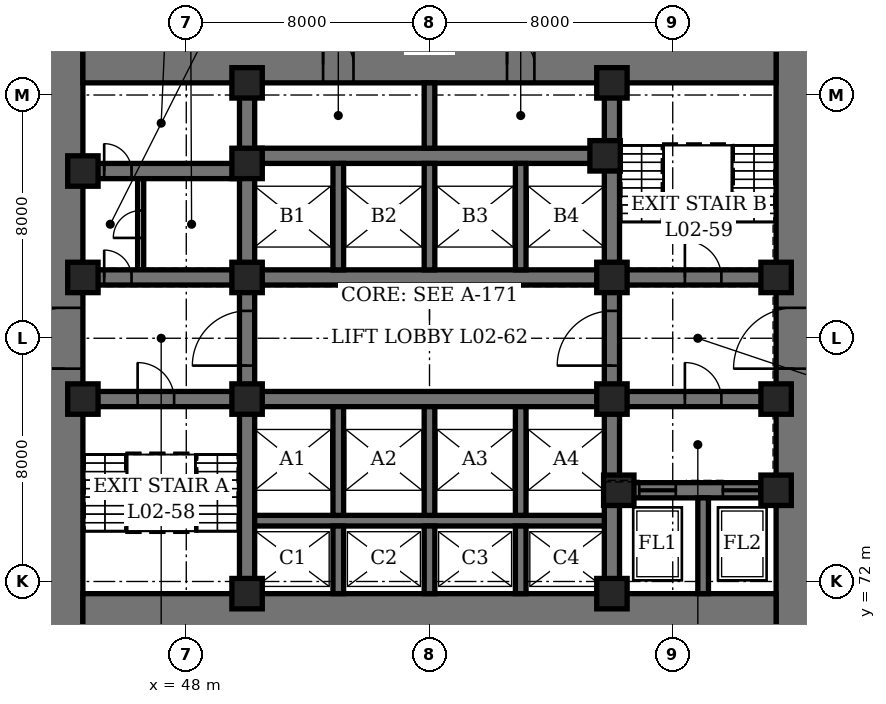
"""IFC4 building model, lengths in metres.
Left out: names, types, materials, properties, quantities, classifications, styles, units other than length and angle.
Written with IfcOpenShell. Run it as: python <this file> out.ifc"""

import sys

from ifc_helpers import new_model, si_unit, direction, frame, frame_2d, origin, origin_2d, place, context, subcontext, project, spatial, rectangle, hollow_rectangle, extrude, element, fill, save


model = new_model("IFC4")
c1 = context("Model", 3, precision=1e-05, world=origin(), true_north=direction((0.0, 1.0)))
c2 = subcontext(c1, "Body", "Model", "MODEL_VIEW")
j1 = project(units=[si_unit("LENGTHUNIT", "METRE"), si_unit("PLANEANGLEUNIT", "RADIAN")], contexts=[c1])
p1 = place(None, origin())
s1 = spatial("IfcSite", under=j1, at=p1, CompositionType="ELEMENT")
p2 = place(p1, origin())
s2 = spatial("IfcBuilding", under=s1, at=p2, CompositionType="ELEMENT")
p3 = place(p2, frame((0.0, 0.0, 9.9)))
s3 = spatial("IfcBuildingStorey", under=s2, at=p3, CompositionType="ELEMENT", Elevation=9.9)
p4 = place(p3, frame((44.0, 70.4, 0.0), z_axis=(0.0, 0.0, 1.0), x_axis=(0.0, 1.0, 0.0)))
e1 = element("IfcWall", 1, at=p4, inside=s3, PredefinedType="SHEAR", context=c2, shape_type="SweptSolid", body=[
    extrude(rectangle(XDim=19.2, YDim=1.2, at=frame_2d((9.6, 0.0))), origin(), (0.0, 0.0, 1.0), 5.0),
])
p5 = place(p4, frame((8.6, 0.0, 0.0)))
e2 = element("IfcOpeningElement", 2, at=p5, cuts=e1, PredefinedType="OPENING", context=c2, shape_type="SweptSolid", body=[
    extrude(rectangle(XDim=2.0, YDim=2.4, at=frame_2d((1.0, 1.2))), frame((0.0, 0.61, 0.0), z_axis=(0.0, -1.0, 0.0), x_axis=(1.0, 0.0, 0.0)), (0.0, 0.0, 1.0), 1.22),
])
p6 = place(p3, frame((68.0, 70.4, 0.0), z_axis=(0.0, 0.0, 1.0), x_axis=(0.0, 1.0, 0.0)))
e3 = element("IfcWall", 3, at=p6, inside=s3, PredefinedType="SHEAR", context=c2, shape_type="SweptSolid", body=[
    extrude(rectangle(XDim=19.2, YDim=1.2, at=frame_2d((9.6, 0.0))), origin(), (0.0, 0.0, 1.0), 5.0),
])
p7 = place(p6, frame((8.6, 0.0, 0.0)))
e4 = element("IfcOpeningElement", 4, at=p7, cuts=e3, PredefinedType="OPENING", context=c2, shape_type="SweptSolid", body=[
    extrude(rectangle(XDim=2.0, YDim=2.4, at=frame_2d((1.0, 1.2))), frame((0.0, 0.61, 0.0), z_axis=(0.0, -1.0, 0.0), x_axis=(1.0, 0.0, 0.0)), (0.0, 0.0, 1.0), 1.22),
])
p8 = place(p3, frame((44.6, 71.0, 0.0), z_axis=(0.0, 0.0, 1.0), x_axis=(1.0, 0.0, 0.0)))
e5 = element("IfcWall", 5, at=p8, inside=s3, PredefinedType="SHEAR", context=c2, shape_type="SweptSolid", body=[
    extrude(rectangle(XDim=22.8, YDim=1.2, at=frame_2d((11.4, 0.0))), origin(), (0.0, 0.0, 1.0), 5.0),
])
p9 = place(p3, frame((44.6, 89.0, 0.0), z_axis=(0.0, 0.0, 1.0), x_axis=(1.0, 0.0, 0.0)))
e6 = element("IfcWall", 6, at=p9, inside=s3, PredefinedType="SHEAR", context=c2, shape_type="SweptSolid", body=[
    extrude(rectangle(XDim=22.8, YDim=1.2, at=frame_2d((11.4, 0.0))), origin(), (0.0, 0.0, 1.0), 5.0),
])
p10 = place(p9, frame((7.9, 0.0, 0.0)))
e7 = element("IfcOpeningElement", 7, at=p10, cuts=e6, PredefinedType="OPENING", context=c2, shape_type="SweptSolid", body=[
    extrude(rectangle(XDim=1.0, YDim=2.1, at=frame_2d((0.5, 1.05))), frame((0.0, 0.61, 0.0), z_axis=(0.0, -1.0, 0.0), x_axis=(1.0, 0.0, 0.0)), (0.0, 0.0, 1.0), 1.22),
])
p11 = place(p9, frame((13.95, 0.0, 0.0)))
e8 = element("IfcOpeningElement", 8, at=p11, cuts=e6, PredefinedType="OPENING", context=c2, shape_type="SweptSolid", body=[
    extrude(rectangle(XDim=0.9, YDim=2.1, at=frame_2d((0.45, 1.05))), frame((0.0, 0.61, 0.0), z_axis=(0.0, -1.0, 0.0), x_axis=(1.0, 0.0, 0.0)), (0.0, 0.0, 1.0), 1.22),
])
p12 = place(p3, frame((50.0, 71.6, 0.0), z_axis=(0.0, 0.0, 1.0), x_axis=(0.0, 1.0, 0.0)))
e9 = element("IfcWall", 9, at=p12, inside=s3, PredefinedType="SHEAR", context=c2, shape_type="SweptSolid", body=[
    extrude(rectangle(XDim=16.8, YDim=0.5, at=frame_2d((8.4, 0.0))), origin(), (0.0, 0.0, 1.0), 5.0),
])
p13 = place(p12, frame((7.5, 0.0, 0.0)))
e10 = element("IfcOpeningElement", 10, at=p13, cuts=e9, PredefinedType="OPENING", context=c2, shape_type="SweptSolid", body=[
    extrude(rectangle(XDim=1.8, YDim=2.4, at=frame_2d((0.9, 1.2))), frame((0.0, 0.26, 0.0), z_axis=(0.0, -1.0, 0.0), x_axis=(1.0, 0.0, 0.0)), (0.0, 0.0, 1.0), 0.52),
])
p14 = place(p3, frame((62.0, 71.6, 0.0), z_axis=(0.0, 0.0, 1.0), x_axis=(0.0, 1.0, 0.0)))
e11 = element("IfcWall", 11, at=p14, inside=s3, PredefinedType="SHEAR", context=c2, shape_type="SweptSolid", body=[
    extrude(rectangle(XDim=16.8, YDim=0.5, at=frame_2d((8.4, 0.0))), origin(), (0.0, 0.0, 1.0), 5.0),
])
p15 = place(p14, frame((7.5, 0.0, 0.0)))
e12 = element("IfcOpeningElement", 12, at=p15, cuts=e11, PredefinedType="OPENING", context=c2, shape_type="SweptSolid", body=[
    extrude(rectangle(XDim=1.8, YDim=2.4, at=frame_2d((0.9, 1.2))), frame((0.0, 0.26, 0.0), z_axis=(0.0, -1.0, 0.0), x_axis=(1.0, 0.0, 0.0)), (0.0, 0.0, 1.0), 0.52),
])
p16 = place(p3, frame((44.6, 78.0, 0.0), z_axis=(0.0, 0.0, 1.0), x_axis=(1.0, 0.0, 0.0)))
e13 = element("IfcWall", 13, at=p16, inside=s3, PredefinedType="SHEAR", context=c2, shape_type="SweptSolid", body=[
    extrude(rectangle(XDim=5.15, YDim=0.5, at=frame_2d((2.575, 0.0))), origin(), (0.0, 0.0, 1.0), 5.0),
])
p17 = place(p16, frame((1.8, 0.0, 0.0)))
e14 = element("IfcOpeningElement", 14, at=p17, cuts=e13, PredefinedType="OPENING", context=c2, shape_type="SweptSolid", body=[
    extrude(rectangle(XDim=1.2, YDim=2.1, at=frame_2d((0.6, 1.05))), frame((0.0, 0.26, 0.0), z_axis=(0.0, -1.0, 0.0), x_axis=(1.0, 0.0, 0.0)), (0.0, 0.0, 1.0), 0.52),
])
p18 = place(p3, frame((44.6, 82.0, 0.0), z_axis=(0.0, 0.0, 1.0), x_axis=(1.0, 0.0, 0.0)))
e15 = element("IfcWall", 15, at=p18, inside=s3, PredefinedType="SHEAR", context=c2, shape_type="SweptSolid", body=[
    extrude(rectangle(XDim=5.15, YDim=0.5, at=frame_2d((2.575, 0.0))), origin(), (0.0, 0.0, 1.0), 5.0),
])
p19 = place(p18, frame((0.7, 0.0, 0.0)))
e16 = element("IfcOpeningElement", 16, at=p19, cuts=e15, PredefinedType="OPENING", context=c2, shape_type="SweptSolid", body=[
    extrude(rectangle(XDim=0.9, YDim=2.1, at=frame_2d((0.45, 1.05))), frame((0.0, 0.26, 0.0), z_axis=(0.0, -1.0, 0.0), x_axis=(1.0, 0.0, 0.0)), (0.0, 0.0, 1.0), 0.52),
])
p20 = place(p3, frame((44.6, 85.5, 0.0), z_axis=(0.0, 0.0, 1.0), x_axis=(1.0, 0.0, 0.0)))
e17 = element("IfcWall", 17, at=p20, inside=s3, PredefinedType="SHEAR", context=c2, shape_type="SweptSolid", body=[
    extrude(rectangle(XDim=5.15, YDim=0.5, at=frame_2d((2.575, 0.0))), origin(), (0.0, 0.0, 1.0), 5.0),
])
p21 = place(p20, frame((0.7, 0.0, 0.0)))
e18 = element("IfcOpeningElement", 18, at=p21, cuts=e17, PredefinedType="OPENING", context=c2, shape_type="SweptSolid", body=[
    extrude(rectangle(XDim=0.9, YDim=2.1, at=frame_2d((0.45, 1.05))), frame((0.0, 0.26, 0.0), z_axis=(0.0, -1.0, 0.0), x_axis=(1.0, 0.0, 0.0)), (0.0, 0.0, 1.0), 0.52),
])
p22 = place(p3, frame((62.25, 75.0, 0.0), z_axis=(0.0, 0.0, 1.0), x_axis=(1.0, 0.0, 0.0)))
e19 = element("IfcWall", 19, at=p22, inside=s3, PredefinedType="SHEAR", context=c2, shape_type="SweptSolid", body=[
    extrude(rectangle(XDim=5.15, YDim=0.5, at=frame_2d((2.575, 0.0))), origin(), (0.0, 0.0, 1.0), 5.0),
])
p23 = place(p22, frame((0.65, 0.0, 0.0)))
e20 = element("IfcOpeningElement", 20, at=p23, cuts=e19, PredefinedType="OPENING", context=c2, shape_type="SweptSolid", body=[
    extrude(rectangle(XDim=1.2, YDim=2.2, at=frame_2d((0.6, 1.1))), frame((0.0, 0.26, 0.0), z_axis=(0.0, -1.0, 0.0), x_axis=(1.0, 0.0, 0.0)), (0.0, 0.0, 1.0), 0.52),
])
p24 = place(p22, frame((3.4, 0.0, 0.0)))
e21 = element("IfcOpeningElement", 21, at=p24, cuts=e19, PredefinedType="OPENING", context=c2, shape_type="SweptSolid", body=[
    extrude(rectangle(XDim=1.2, YDim=2.2, at=frame_2d((0.6, 1.1))), frame((0.0, 0.26, 0.0), z_axis=(0.0, -1.0, 0.0), x_axis=(1.0, 0.0, 0.0)), (0.0, 0.0, 1.0), 0.52),
])
p25 = place(p3, frame((62.25, 78.0, 0.0), z_axis=(0.0, 0.0, 1.0), x_axis=(1.0, 0.0, 0.0)))
e22 = element("IfcWall", 22, at=p25, inside=s3, PredefinedType="SHEAR", context=c2, shape_type="SweptSolid", body=[
    extrude(rectangle(XDim=5.15, YDim=0.5, at=frame_2d((2.575, 0.0))), origin(), (0.0, 0.0, 1.0), 5.0),
])
p26 = place(p25, frame((2.15, 0.0, 0.0)))
e23 = element("IfcOpeningElement", 23, at=p26, cuts=e22, PredefinedType="OPENING", context=c2, shape_type="SweptSolid", body=[
    extrude(rectangle(XDim=1.2, YDim=2.1, at=frame_2d((0.6, 1.05))), frame((0.0, 0.26, 0.0), z_axis=(0.0, -1.0, 0.0), x_axis=(1.0, 0.0, 0.0)), (0.0, 0.0, 1.0), 0.52),
])
p27 = place(p3, frame((62.25, 82.0, 0.0), z_axis=(0.0, 0.0, 1.0), x_axis=(1.0, 0.0, 0.0)))
e24 = element("IfcWall", 24, at=p27, inside=s3, PredefinedType="SHEAR", context=c2, shape_type="SweptSolid", body=[
    extrude(rectangle(XDim=5.15, YDim=0.5, at=frame_2d((2.575, 0.0))), origin(), (0.0, 0.0, 1.0), 5.0),
])
p28 = place(p27, frame((2.15, 0.0, 0.0)))
e25 = element("IfcOpeningElement", 25, at=p28, cuts=e24, PredefinedType="OPENING", context=c2, shape_type="SweptSolid", body=[
    extrude(rectangle(XDim=1.2, YDim=2.1, at=frame_2d((0.6, 1.05))), frame((0.0, 0.26, 0.0), z_axis=(0.0, -1.0, 0.0), x_axis=(1.0, 0.0, 0.0)), (0.0, 0.0, 1.0), 0.52),
])
for number, where, z_axis, x_axis in (
    (26, (50.25, 78.0, 0.0), (0.0, 0.0, 1.0), (1.0, 0.0, 0.0)),
    (27, (50.25, 82.0, 0.0), (0.0, 0.0, 1.0), (1.0, 0.0, 0.0)),
    (28, (50.25, 86.0, 0.0), (0.0, 0.0, 1.0), (1.0, 0.0, 0.0)),
):
    element("IfcWall", number, at=place(p3, frame(where, z_axis=z_axis, x_axis=x_axis)), inside=s3, PredefinedType="SHEAR", context=c2, shape_type="SweptSolid", body=[
        extrude(rectangle(XDim=11.5, YDim=0.5, at=frame_2d((5.75, 0.0))), origin(), (0.0, 0.0, 1.0), 5.0),
    ])
p29 = place(p3, frame((50.25, 74.0, 0.0), z_axis=(0.0, 0.0, 1.0), x_axis=(1.0, 0.0, 0.0)))
e29 = element("IfcWall", 29, at=p29, inside=s3, PredefinedType="SHEAR", context=c2, shape_type="SweptSolid", body=[
    extrude(rectangle(XDim=11.5, YDim=0.35, at=frame_2d((5.75, 0.0))), origin(), (0.0, 0.0, 1.0), 5.0),
])
p30 = place(p3, frame((53.0, 71.6, 0.0), z_axis=(0.0, 0.0, 1.0), x_axis=(0.0, 1.0, 0.0)))
e30 = element("IfcWall", 30, at=p30, inside=s3, PredefinedType="SHEAR", context=c2, shape_type="SweptSolid", body=[
    extrude(rectangle(XDim=2.225, YDim=0.35, at=frame_2d((1.112, 0.0))), origin(), (0.0, 0.0, 1.0), 5.0),
])
p31 = place(p3, frame((53.0, 74.175, 0.0), z_axis=(0.0, 0.0, 1.0), x_axis=(0.0, 1.0, 0.0)))
e31 = element("IfcWall", 31, at=p31, inside=s3, PredefinedType="SHEAR", context=c2, shape_type="SweptSolid", body=[
    extrude(rectangle(XDim=3.575, YDim=0.35, at=frame_2d((1.788, 0.0))), origin(), (0.0, 0.0, 1.0), 5.0),
])
p32 = place(p3, frame((53.0, 82.25, 0.0), z_axis=(0.0, 0.0, 1.0), x_axis=(0.0, 1.0, 0.0)))
e32 = element("IfcWall", 32, at=p32, inside=s3, PredefinedType="SHEAR", context=c2, shape_type="SweptSolid", body=[
    extrude(rectangle(XDim=3.5, YDim=0.35, at=frame_2d((1.75, 0.0))), origin(), (0.0, 0.0, 1.0), 5.0),
])
p33 = place(p3, frame((56.0, 71.6, 0.0), z_axis=(0.0, 0.0, 1.0), x_axis=(0.0, 1.0, 0.0)))
e33 = element("IfcWall", 33, at=p33, inside=s3, PredefinedType="SHEAR", context=c2, shape_type="SweptSolid", body=[
    extrude(rectangle(XDim=2.225, YDim=0.35, at=frame_2d((1.112, 0.0))), origin(), (0.0, 0.0, 1.0), 5.0),
])
p34 = place(p3, frame((56.0, 74.175, 0.0), z_axis=(0.0, 0.0, 1.0), x_axis=(0.0, 1.0, 0.0)))
e34 = element("IfcWall", 34, at=p34, inside=s3, PredefinedType="SHEAR", context=c2, shape_type="SweptSolid", body=[
    extrude(rectangle(XDim=3.575, YDim=0.35, at=frame_2d((1.788, 0.0))), origin(), (0.0, 0.0, 1.0), 5.0),
])
p35 = place(p3, frame((56.0, 82.25, 0.0), z_axis=(0.0, 0.0, 1.0), x_axis=(0.0, 1.0, 0.0)))
e35 = element("IfcWall", 35, at=p35, inside=s3, PredefinedType="SHEAR", context=c2, shape_type="SweptSolid", body=[
    extrude(rectangle(XDim=3.5, YDim=0.35, at=frame_2d((1.75, 0.0))), origin(), (0.0, 0.0, 1.0), 5.0),
])
p36 = place(p3, frame((59.0, 71.6, 0.0), z_axis=(0.0, 0.0, 1.0), x_axis=(0.0, 1.0, 0.0)))
e36 = element("IfcWall", 36, at=p36, inside=s3, PredefinedType="SHEAR", context=c2, shape_type="SweptSolid", body=[
    extrude(rectangle(XDim=2.225, YDim=0.35, at=frame_2d((1.112, 0.0))), origin(), (0.0, 0.0, 1.0), 5.0),
])
p37 = place(p3, frame((59.0, 74.175, 0.0), z_axis=(0.0, 0.0, 1.0), x_axis=(0.0, 1.0, 0.0)))
e37 = element("IfcWall", 37, at=p37, inside=s3, PredefinedType="SHEAR", context=c2, shape_type="SweptSolid", body=[
    extrude(rectangle(XDim=3.575, YDim=0.35, at=frame_2d((1.788, 0.0))), origin(), (0.0, 0.0, 1.0), 5.0),
])
p38 = place(p3, frame((59.0, 82.25, 0.0), z_axis=(0.0, 0.0, 1.0), x_axis=(0.0, 1.0, 0.0)))
e38 = element("IfcWall", 38, at=p38, inside=s3, PredefinedType="SHEAR", context=c2, shape_type="SweptSolid", body=[
    extrude(rectangle(XDim=3.5, YDim=0.35, at=frame_2d((1.75, 0.0))), origin(), (0.0, 0.0, 1.0), 5.0),
])
p39 = place(p3, frame((65.0, 71.6, 0.0), z_axis=(0.0, 0.0, 1.0), x_axis=(0.0, 1.0, 0.0)))
e39 = element("IfcWall", 39, at=p39, inside=s3, PredefinedType="SHEAR", context=c2, shape_type="SweptSolid", body=[
    extrude(rectangle(XDim=3.15, YDim=0.35, at=frame_2d((1.575, 0.0))), origin(), (0.0, 0.0, 1.0), 5.0),
])
p40 = place(p3, frame((56.0, 86.25, 0.0), z_axis=(0.0, 0.0, 1.0), x_axis=(0.0, 1.0, 0.0)))
e40 = element("IfcWall", 40, at=p40, inside=s3, PredefinedType="SHEAR", context=c2, shape_type="SweptSolid", body=[
    extrude(rectangle(XDim=2.15, YDim=0.35, at=frame_2d((1.075, 0.0))), origin(), (0.0, 0.0, 1.0), 5.0),
])
for number, where, z_axis, x_axis in (
    (41, (44.6, 78.0, 0.0), (0.0, 0.0, 1.0), (1.0, 0.0, 0.0)),
    (42, (44.6, 82.0, 0.0), (0.0, 0.0, 1.0), (1.0, 0.0, 0.0)),
    (43, (44.6, 85.5, 0.0), (0.0, 0.0, 1.0), (1.0, 0.0, 0.0)),
    (44, (50.0, 71.6, 0.0), (0.0, 0.0, 1.0), (1.0, 0.0, 0.0)),
    (45, (50.0, 78.0, 0.0), (0.0, 0.0, 1.0), (1.0, 0.0, 0.0)),
    (46, (50.0, 82.0, 0.0), (0.0, 0.0, 1.0), (1.0, 0.0, 0.0)),
    (47, (50.0, 85.75, 0.0), (0.0, 0.0, 1.0), (1.0, 0.0, 0.0)),
    (48, (50.0, 88.4, 0.0), (0.0, 0.0, 1.0), (1.0, 0.0, 0.0)),
    (49, (61.775, 86.0, 0.0), (0.0, 0.0, 1.0), (1.0, 0.0, 0.0)),
    (50, (62.0, 71.6, 0.0), (0.0, 0.0, 1.0), (1.0, 0.0, 0.0)),
    (51, (62.0, 78.0, 0.0), (0.0, 0.0, 1.0), (1.0, 0.0, 0.0)),
    (52, (62.0, 82.0, 0.0), (0.0, 0.0, 1.0), (1.0, 0.0, 0.0)),
    (53, (62.0, 88.4, 0.0), (0.0, 0.0, 1.0), (1.0, 0.0, 0.0)),
    (54, (62.225, 75.0, 0.0), (0.0, 0.0, 1.0), (1.0, 0.0, 0.0)),
    (55, (67.4, 75.0, 0.0), (0.0, 0.0, 1.0), (1.0, 0.0, 0.0)),
    (56, (67.4, 78.0, 0.0), (0.0, 0.0, 1.0), (1.0, 0.0, 0.0)),
    (57, (67.4, 82.0, 0.0), (0.0, 0.0, 1.0), (1.0, 0.0, 0.0)),
):
    element("IfcColumn", number, at=place(p3, frame(where, z_axis=z_axis, x_axis=x_axis)), inside=s3, PredefinedType="COLUMN", context=c2, shape_type="SweptSolid", body=[
        extrude(hollow_rectangle(XDim=1.0, YDim=1.0, WallThickness=0.15, at=origin_2d()), origin(), (0.0, 0.0, 1.0), 5.0),
    ])
p41 = place(p3, frame((46.5, 82.25, 0.0), z_axis=(0.0, 0.0, 1.0), x_axis=(0.0, 1.0, 0.0)))
e58 = element("IfcWall", 58, at=p41, inside=s3, PredefinedType="PARTITIONING", context=c2, shape_type="SweptSolid", body=[
    extrude(rectangle(XDim=3.0, YDim=0.2, at=frame_2d((1.5, 0.0))), origin(), (0.0, 0.0, 1.0), 4.8),
])
p42 = place(p41, frame((1.05, 0.0, 0.0)))
e59 = element("IfcOpeningElement", 59, at=p42, cuts=e58, PredefinedType="OPENING", context=c2, shape_type="SweptSolid", body=[
    extrude(rectangle(XDim=0.9, YDim=2.1, at=frame_2d((0.45, 1.05))), frame((0.0, 0.11, 0.0), z_axis=(0.0, -1.0, 0.0), x_axis=(1.0, 0.0, 0.0)), (0.0, 0.0, 1.0), 0.22),
])
p43 = place(p19, origin())
e60 = element("IfcDoor", 60, at=p43, inside=s3, OperationType="SINGLE_SWING_LEFT", PredefinedType="DOOR", context=c2, shape_type="SweptSolid", body=[
    extrude(rectangle(XDim=0.9, YDim=2.1, at=frame_2d((0.45, 1.05))), frame((0.0, 0.25, 0.0), z_axis=(0.0, -1.0, 0.0), x_axis=(1.0, 0.0, 0.0)), (0.0, 0.0, 1.0), 0.5),
])
fill(e16, e60)
p44 = place(p42, origin())
e61 = element("IfcDoor", 61, at=p44, inside=s3, OperationType="SINGLE_SWING_RIGHT", PredefinedType="DOOR", context=c2, shape_type="SweptSolid", body=[
    extrude(rectangle(XDim=0.9, YDim=2.1, at=frame_2d((0.45, 1.05))), frame((0.0, 0.1, 0.0), z_axis=(0.0, -1.0, 0.0), x_axis=(1.0, 0.0, 0.0)), (0.0, 0.0, 1.0), 0.199),
])
fill(e59, e61)
p45 = place(p21, origin())
e62 = element("IfcDoor", 62, at=p45, inside=s3, OperationType="SINGLE_SWING_RIGHT", PredefinedType="DOOR", context=c2, shape_type="SweptSolid", body=[
    extrude(rectangle(XDim=0.9, YDim=2.1, at=frame_2d((0.45, 1.05))), frame((0.0, 0.25, 0.0), z_axis=(0.0, -1.0, 0.0), x_axis=(1.0, 0.0, 0.0)), (0.0, 0.0, 1.0), 0.5),
])
fill(e18, e62)
p46 = place(p10, origin())
e63 = element("IfcDoor", 63, at=p46, inside=s3, OperationType="SINGLE_SWING_LEFT", PredefinedType="DOOR", context=c2, shape_type="SweptSolid", body=[
    extrude(rectangle(XDim=1.0, YDim=2.1, at=frame_2d((0.5, 1.05))), frame((0.0, 0.35, 0.0), z_axis=(0.0, -1.0, 0.0), x_axis=(1.0, 0.0, 0.0)), (0.0, 0.0, 1.0), 0.7),
])
fill(e7, e63)
p47 = place(p11, origin())
e64 = element("IfcDoor", 64, at=p47, inside=s3, OperationType="SINGLE_SWING_LEFT", PredefinedType="DOOR", context=c2, shape_type="SweptSolid", body=[
    extrude(rectangle(XDim=0.9, YDim=2.1, at=frame_2d((0.45, 1.05))), frame((0.0, 0.35, 0.0), z_axis=(0.0, -1.0, 0.0), x_axis=(1.0, 0.0, 0.0)), (0.0, 0.0, 1.0), 0.7),
])
fill(e8, e64)
p48 = place(p17, origin())
e65 = element("IfcDoor", 65, at=p48, inside=s3, OperationType="SINGLE_SWING_LEFT", PredefinedType="DOOR", context=c2, shape_type="SweptSolid", body=[
    extrude(rectangle(XDim=1.2, YDim=2.1, at=frame_2d((0.6, 1.05))), frame((0.0, 0.25, 0.0), z_axis=(0.0, -1.0, 0.0), x_axis=(1.0, 0.0, 0.0)), (0.0, 0.0, 1.0), 0.5),
])
fill(e14, e65)
p49 = place(p28, origin())
e66 = element("IfcDoor", 66, at=p49, inside=s3, OperationType="SINGLE_SWING_LEFT", PredefinedType="DOOR", context=c2, shape_type="SweptSolid", body=[
    extrude(rectangle(XDim=1.2, YDim=2.1, at=frame_2d((0.6, 1.05))), frame((0.0, 0.25, 0.0), z_axis=(0.0, -1.0, 0.0), x_axis=(1.0, 0.0, 0.0)), (0.0, 0.0, 1.0), 0.5),
])
fill(e25, e66)
p50 = place(p5, origin())
e67 = element("IfcDoor", 67, at=p50, inside=s3, OperationType="DOUBLE_DOOR_SINGLE_SWING", PredefinedType="DOOR", context=c2, shape_type="SweptSolid", body=[
    extrude(rectangle(XDim=2.0, YDim=2.4, at=frame_2d((1.0, 1.2))), frame((0.0, 0.35, 0.0), z_axis=(0.0, -1.0, 0.0), x_axis=(1.0, 0.0, 0.0)), (0.0, 0.0, 1.0), 0.7),
])
fill(e2, e67)
p51 = place(p7, origin())
e68 = element("IfcDoor", 68, at=p51, inside=s3, OperationType="DOUBLE_DOOR_SINGLE_SWING", PredefinedType="DOOR", context=c2, shape_type="SweptSolid", body=[
    extrude(rectangle(XDim=2.0, YDim=2.4, at=frame_2d((1.0, 1.2))), frame((0.0, 0.35, 0.0), z_axis=(0.0, -1.0, 0.0), x_axis=(1.0, 0.0, 0.0)), (0.0, 0.0, 1.0), 0.7),
])
fill(e4, e68)
p52 = place(p13, origin())
e69 = element("IfcDoor", 69, at=p52, inside=s3, OperationType="DOUBLE_DOOR_SINGLE_SWING", PredefinedType="DOOR", context=c2, shape_type="SweptSolid", body=[
    extrude(rectangle(XDim=1.8, YDim=2.4, at=frame_2d((0.9, 1.2))), frame((0.0, 0.25, 0.0), z_axis=(0.0, -1.0, 0.0), x_axis=(1.0, 0.0, 0.0)), (0.0, 0.0, 1.0), 0.5),
])
fill(e10, e69)
p53 = place(p15, origin())
e70 = element("IfcDoor", 70, at=p53, inside=s3, OperationType="DOUBLE_DOOR_SINGLE_SWING", PredefinedType="DOOR", context=c2, shape_type="SweptSolid", body=[
    extrude(rectangle(XDim=1.8, YDim=2.4, at=frame_2d((0.9, 1.2))), frame((0.0, 0.25, 0.0), z_axis=(0.0, -1.0, 0.0), x_axis=(1.0, 0.0, 0.0)), (0.0, 0.0, 1.0), 0.5),
])
fill(e12, e70)
p54 = place(p26, origin())
e71 = element("IfcDoor", 71, at=p54, inside=s3, OperationType="SINGLE_SWING_RIGHT", PredefinedType="DOOR", context=c2, shape_type="SweptSolid", body=[
    extrude(rectangle(XDim=1.2, YDim=2.1, at=frame_2d((0.6, 1.05))), frame((0.0, 0.25, 0.0), z_axis=(0.0, -1.0, 0.0), x_axis=(1.0, 0.0, 0.0)), (0.0, 0.0, 1.0), 0.5),
])
fill(e23, e71)
p55 = place(p23, origin())
e72 = element("IfcDoor", 72, at=p55, inside=s3, OperationType="SLIDING_TO_LEFT", PredefinedType="DOOR", context=c2, shape_type="SweptSolid", body=[
    extrude(rectangle(XDim=1.2, YDim=2.2, at=frame_2d((0.6, 1.1))), frame((0.0, 0.25, 0.0), z_axis=(0.0, -1.0, 0.0), x_axis=(1.0, 0.0, 0.0)), (0.0, 0.0, 1.0), 0.5),
])
fill(e20, e72)
p56 = place(p24, origin())
e73 = element("IfcDoor", 73, at=p56, inside=s3, OperationType="SLIDING_TO_LEFT", PredefinedType="DOOR", context=c2, shape_type="SweptSolid", body=[
    extrude(rectangle(XDim=1.2, YDim=2.2, at=frame_2d((0.6, 1.1))), frame((0.0, 0.25, 0.0), z_axis=(0.0, -1.0, 0.0), x_axis=(1.0, 0.0, 0.0)), (0.0, 0.0, 1.0), 0.5),
])
fill(e21, e73)
save(model, sys.argv[1])
